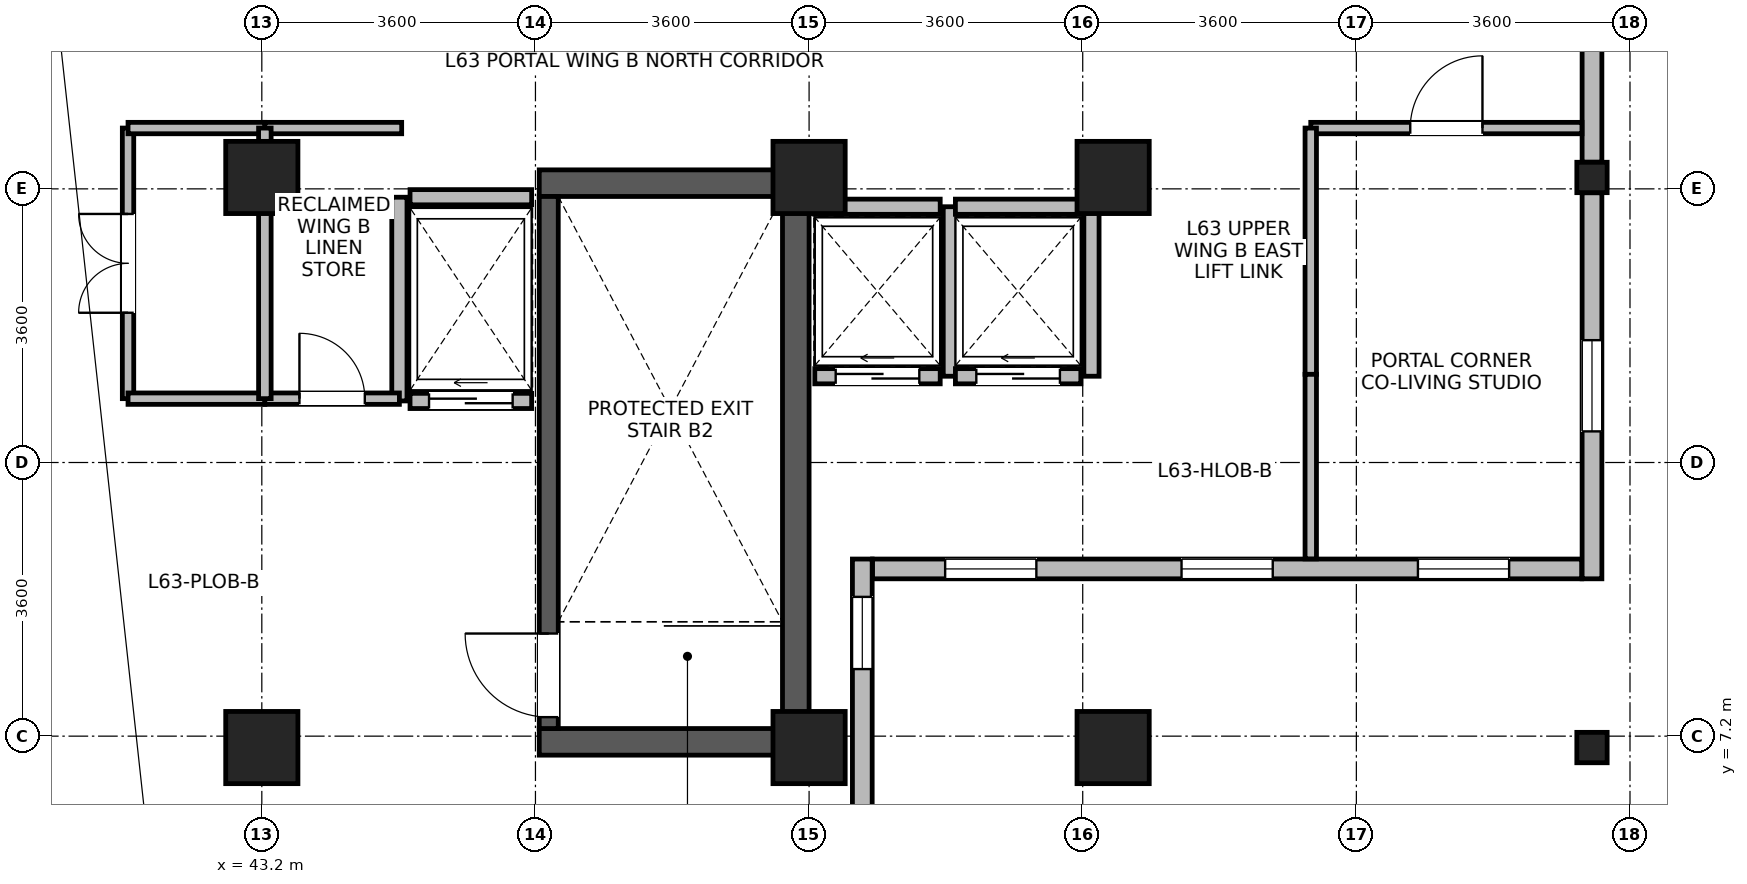
"""IFC4 building model, lengths in metres.
Left out: names, types, materials, properties, quantities, classifications, styles, units other than length and angle.
Written with IfcOpenShell. Run it as: python <this file> out.ifc"""

import sys

from ifc_helpers import new_model, si_unit, direction, frame, frame_2d, origin, origin_2d, place, context, subcontext, project, spatial, rectangle, i_section, extrude, source, transform, mapped, element, fill, save


model = new_model("IFC4")
c1 = context("Model", 3, precision=1e-05, world=origin(), true_north=direction((0.0, 1.0)))
c2 = subcontext(c1, "Body", "Model", "MODEL_VIEW")
j1 = project(units=[si_unit("LENGTHUNIT", "METRE"), si_unit("PLANEANGLEUNIT", "RADIAN")], contexts=[c1])
p1 = place(None, origin())
s1 = spatial("IfcSite", under=j1, at=p1, CompositionType="ELEMENT")
p2 = place(p1, origin())
s2 = spatial("IfcBuilding", under=s1, at=p2, CompositionType="ELEMENT")
p3 = place(p2, frame((0.0, 0.0, 246.2)))
s3 = spatial("IfcBuildingStorey", under=s2, at=p3, CompositionType="ELEMENT", Elevation=246.2)
p4 = place(p3, frame((50.225, 6.95, 0.0), z_axis=(0.0, 0.0, 1.0), x_axis=(0.0, 1.0, 0.0)))
e1 = element("IfcWall", 1, at=p4, inside=s3, PredefinedType="SHEAR", context=c2, shape_type="SweptSolid", body=[
    extrude(rectangle(XDim=7.7, YDim=0.35, at=frame_2d((3.85, 0.0))), origin(), (0.0, 0.0, 1.0), 3.28),
])
for number, where, z_axis, x_axis in (
    (2, (46.85, 7.125, 0.0), (0.0, 0.0, 1.0), (1.0, 0.0, 0.0)),
    (3, (46.85, 14.475, 0.0), (0.0, 0.0, 1.0), (1.0, 0.0, 0.0)),
):
    element("IfcWall", number, at=place(p3, frame(where, z_axis=z_axis, x_axis=x_axis)), inside=s3, PredefinedType="SHEAR", context=c2, shape_type="SweptSolid", body=[
        extrude(rectangle(XDim=3.2, YDim=0.35, at=frame_2d((1.6, 0.0))), origin(), (0.0, 0.0, 1.0), 3.28),
    ])
p5 = place(p3, frame((46.975, 7.3, 0.0), z_axis=(0.0, 0.0, 1.0), x_axis=(0.0, 1.0, 0.0)))
e4 = element("IfcWall", 4, at=p5, inside=s3, PredefinedType="SHEAR", context=c2, shape_type="SweptSolid", body=[
    extrude(rectangle(XDim=7.0, YDim=0.25, at=frame_2d((3.5, 0.0))), origin(), (0.0, 0.0, 1.0), 3.28),
])
p6 = place(p5, frame((0.15, 0.0, 0.0)))
e5 = element("IfcOpeningElement", 5, at=p6, cuts=e4, PredefinedType="OPENING", context=c2, shape_type="SweptSolid", body=[
    extrude(rectangle(XDim=1.1, YDim=2.08, at=frame_2d((0.55, 1.04))), frame((0.0, 0.135, 0.0), z_axis=(0.0, -1.0, 0.0), x_axis=(1.0, 0.0, 0.0)), (0.0, 0.0, 1.0), 0.27),
])
m1 = source(origin(), c2, "Body", "SweptSolid", [
    extrude(rectangle(XDim=0.95, YDim=0.95, at=origin_2d()), origin(), (0.0, 0.0, 1.0), 3.7),
])
for number, where, z_axis, x_axis in (
    (6, (43.2, 7.05, 0.0), (0.0, 0.0, 1.0), (1.0, 0.0, 0.0)),
    (7, (43.2, 14.55, 0.0), (0.0, 0.0, 1.0), (1.0, 0.0, 0.0)),
    (8, (50.4, 7.05, 0.0), (0.0, 0.0, 1.0), (1.0, 0.0, 0.0)),
    (9, (50.4, 14.55, 0.0), (0.0, 0.0, 1.0), (1.0, 0.0, 0.0)),
    (10, (54.4, 7.05, 0.0), (0.0, 0.0, 1.0), (1.0, 0.0, 0.0)),
    (11, (54.4, 14.55, 0.0), (0.0, 0.0, 1.0), (1.0, 0.0, 0.0)),
):
    element("IfcColumn", number, at=place(p3, frame(where, z_axis=z_axis, x_axis=x_axis)), inside=s3, PredefinedType="COLUMN", context=c2, shape_type="MappedRepresentation", body=[
        mapped(m1, transform((0.0, 0.0, 0.0), x_axis=(1.0, 0.0, 0.0), y_axis=(0.0, 1.0, 0.0), z_axis=(0.0, 0.0, 1.0), scale=1.0)),
    ])
m2 = source(origin(), c2, "Body", "SweptSolid", [
    extrude(i_section(OverallWidth=0.399, OverallDepth=0.4, WebThickness=0.017, FlangeThickness=0.023, FilletRadius=0.015, at=origin_2d()), origin(), (0.0, 0.0, 1.0), 3.7),
])
for number, where, z_axis, x_axis in (
    (12, (60.7, 7.05, 0.0), (0.0, 0.0, 1.0), (1.0, 0.0, 0.0)),
    (13, (60.7, 14.55, 0.0), (0.0, 0.0, 1.0), (1.0, 0.0, 0.0)),
):
    element("IfcColumn", number, at=place(p3, frame(where, z_axis=z_axis, x_axis=x_axis)), inside=s3, PredefinedType="COLUMN", context=c2, shape_type="MappedRepresentation", body=[
        mapped(m2, transform((0.0, 0.0, 0.0), x_axis=(1.0, 0.0, 0.0), y_axis=(0.0, 1.0, 0.0), z_axis=(0.0, 0.0, 1.0), scale=1.0)),
    ])
p7 = place(p3, frame((51.1, 9.53, 0.0), z_axis=(0.0, 0.0, 1.0), x_axis=(0.0, -1.0, 0.0)))
e14 = element("IfcWall", 14, at=p7, inside=s3, PredefinedType="STANDARD", context=c2, shape_type="SweptSolid", body=[
    extrude(rectangle(XDim=3.86, YDim=0.26, at=frame_2d((1.93, 0.0))), origin(), (0.0, 0.0, 1.0), 3.26),
])
p8 = place(p7, frame((0.498, 0.0, 0.85)))
e15 = element("IfcOpeningElement", 15, at=p8, cuts=e14, PredefinedType="OPENING", context=c2, shape_type="SweptSolid", body=[
    extrude(rectangle(XDim=0.95, YDim=1.75, at=frame_2d((0.475, 0.875))), frame((0.0, 0.14, 0.0), z_axis=(0.0, -1.0, 0.0), x_axis=(1.0, 0.0, 0.0)), (0.0, 0.0, 1.0), 0.28),
])
p9 = place(p3, frame((60.565, 9.4, 0.0), z_axis=(0.0, 0.0, 1.0), x_axis=(-1.0, 0.0, 0.0)))
e16 = element("IfcWall", 16, at=p9, inside=s3, PredefinedType="STANDARD", context=c2, shape_type="SweptSolid", body=[
    extrude(rectangle(XDim=9.33, YDim=0.26, at=frame_2d((4.665, 0.0))), origin(), (0.0, 0.0, 1.0), 3.26),
])
p10 = place(p9, frame((0.955, 0.0, 0.85)))
e17 = element("IfcOpeningElement", 17, at=p10, cuts=e16, PredefinedType="OPENING", context=c2, shape_type="SweptSolid", body=[
    extrude(rectangle(XDim=1.2, YDim=1.75, at=frame_2d((0.6, 0.875))), frame((0.0, 0.14, 0.0), z_axis=(0.0, -1.0, 0.0), x_axis=(1.0, 0.0, 0.0)), (0.0, 0.0, 1.0), 0.28),
])
p11 = place(p9, frame((4.065, 0.0, 0.85)))
e18 = element("IfcOpeningElement", 18, at=p11, cuts=e16, PredefinedType="OPENING", context=c2, shape_type="SweptSolid", body=[
    extrude(rectangle(XDim=1.2, YDim=1.75, at=frame_2d((0.6, 0.875))), frame((0.0, 0.14, 0.0), z_axis=(0.0, -1.0, 0.0), x_axis=(1.0, 0.0, 0.0)), (0.0, 0.0, 1.0), 0.28),
])
p12 = place(p9, frame((7.175, 0.0, 0.85)))
e19 = element("IfcOpeningElement", 19, at=p12, cuts=e16, PredefinedType="OPENING", context=c2, shape_type="SweptSolid", body=[
    extrude(rectangle(XDim=1.2, YDim=1.75, at=frame_2d((0.6, 0.875))), frame((0.0, 0.14, 0.0), z_axis=(0.0, -1.0, 0.0), x_axis=(1.0, 0.0, 0.0)), (0.0, 0.0, 1.0), 0.28),
])
p13 = place(p3, frame((60.7, 14.349, 0.0), z_axis=(0.0, 0.0, 1.0), x_axis=(0.0, -1.0, 0.0)))
e20 = element("IfcWall", 20, at=p13, inside=s3, PredefinedType="STANDARD", context=c2, shape_type="SweptSolid", body=[
    extrude(rectangle(XDim=5.079, YDim=0.26, at=frame_2d((2.54, 0.0))), origin(), (0.0, 0.0, 1.0), 2.86),
])
p14 = place(p13, frame((1.939, 0.0, 0.85)))
e21 = element("IfcOpeningElement", 21, at=p14, cuts=e20, PredefinedType="OPENING", context=c2, shape_type="SweptSolid", body=[
    extrude(rectangle(XDim=1.2, YDim=1.75, at=frame_2d((0.6, 0.875))), frame((0.0, 0.14, 0.0), z_axis=(0.0, -1.0, 0.0), x_axis=(1.0, 0.0, 0.0)), (0.0, 0.0, 1.0), 0.28),
])
p15 = place(p3, frame((60.7, 21.399, 0.0), z_axis=(0.0, 0.0, 1.0), x_axis=(0.0, -1.0, 0.0)))
e22 = element("IfcWall", 22, at=p15, inside=s3, PredefinedType="STANDARD", context=c2, shape_type="SweptSolid", body=[
    extrude(rectangle(XDim=6.648, YDim=0.26, at=frame_2d((3.324, 0.0))), origin(), (0.0, 0.0, 1.0), 2.86),
])
p16 = place(p15, frame((1.062, 0.0, 0.85)))
e23 = element("IfcOpeningElement", 23, at=p16, cuts=e22, PredefinedType="OPENING", context=c2, shape_type="SweptSolid", body=[
    extrude(rectangle(XDim=1.2, YDim=1.75, at=frame_2d((0.6, 0.875))), frame((0.0, 0.14, 0.0), z_axis=(0.0, -1.0, 0.0), x_axis=(1.0, 0.0, 0.0)), (0.0, 0.0, 1.0), 0.28),
])
p17 = place(p15, frame((2.849, 0.0, 0.85)))
e24 = element("IfcOpeningElement", 24, at=p17, cuts=e22, PredefinedType="OPENING", context=c2, shape_type="SweptSolid", body=[
    extrude(rectangle(XDim=0.95, YDim=1.75, at=frame_2d((0.475, 0.875))), frame((0.0, 0.14, 0.0), z_axis=(0.0, -1.0, 0.0), x_axis=(1.0, 0.0, 0.0)), (0.0, 0.0, 1.0), 0.28),
])
p18 = place(p3, frame((50.475, 11.935, 0.0), z_axis=(0.0, 0.0, 1.0), x_axis=(1.0, 0.0, 0.0)))
e25 = element("IfcWall", 25, at=p18, inside=s3, PredefinedType="PARTITIONING", context=c2, shape_type="SweptSolid", body=[
    extrude(rectangle(XDim=1.65, YDim=0.2, at=frame_2d((0.825, 0.0))), origin(), (0.0, 0.0, 1.0), 3.26),
])
p19 = place(p18, frame((0.275, 0.0, 0.0)))
e26 = element("IfcOpeningElement", 26, at=p19, cuts=e25, PredefinedType="OPENING", context=c2, shape_type="SweptSolid", body=[
    extrude(rectangle(XDim=1.1, YDim=2.12, at=frame_2d((0.55, 1.06))), frame((0.0, 0.11, 0.0), z_axis=(0.0, -1.0, 0.0), x_axis=(1.0, 0.0, 0.0)), (0.0, 0.0, 1.0), 0.22),
])
p20 = place(p3, frame((50.475, 14.165, 0.0), z_axis=(0.0, 0.0, 1.0), x_axis=(1.0, 0.0, 0.0)))
e27 = element("IfcWall", 27, at=p20, inside=s3, PredefinedType="PARTITIONING", context=c2, shape_type="SweptSolid", body=[
    extrude(rectangle(XDim=1.65, YDim=0.2, at=frame_2d((0.825, 0.0))), origin(), (0.0, 0.0, 1.0), 3.26),
])
p21 = place(p3, frame((52.265, 11.935, 0.0), z_axis=(0.0, 0.0, 1.0), x_axis=(0.0, 1.0, 0.0)))
e28 = element("IfcWall", 28, at=p21, inside=s3, PredefinedType="PARTITIONING", context=c2, shape_type="SweptSolid", body=[
    extrude(rectangle(XDim=2.23, YDim=0.2, at=frame_2d((1.115, 0.0))), origin(), (0.0, 0.0, 1.0), 3.26),
])
p22 = place(p3, frame((52.325, 11.935, 0.0), z_axis=(0.0, 0.0, 1.0), x_axis=(1.0, 0.0, 0.0)))
e29 = element("IfcWall", 29, at=p22, inside=s3, PredefinedType="PARTITIONING", context=c2, shape_type="SweptSolid", body=[
    extrude(rectangle(XDim=1.65, YDim=0.2, at=frame_2d((0.825, 0.0))), origin(), (0.0, 0.0, 1.0), 3.26),
])
p23 = place(p22, frame((0.275, 0.0, 0.0)))
e30 = element("IfcOpeningElement", 30, at=p23, cuts=e29, PredefinedType="OPENING", context=c2, shape_type="SweptSolid", body=[
    extrude(rectangle(XDim=1.1, YDim=2.12, at=frame_2d((0.55, 1.06))), frame((0.0, 0.11, 0.0), z_axis=(0.0, -1.0, 0.0), x_axis=(1.0, 0.0, 0.0)), (0.0, 0.0, 1.0), 0.22),
])
p24 = place(p3, frame((52.325, 14.165, 0.0), z_axis=(0.0, 0.0, 1.0), x_axis=(1.0, 0.0, 0.0)))
e31 = element("IfcWall", 31, at=p24, inside=s3, PredefinedType="PARTITIONING", context=c2, shape_type="SweptSolid", body=[
    extrude(rectangle(XDim=1.65, YDim=0.2, at=frame_2d((0.825, 0.0))), origin(), (0.0, 0.0, 1.0), 3.26),
])
p25 = place(p3, frame((54.115, 11.935, 0.0), z_axis=(0.0, 0.0, 1.0), x_axis=(0.0, 1.0, 0.0)))
e32 = element("IfcWall", 32, at=p25, inside=s3, PredefinedType="PARTITIONING", context=c2, shape_type="SweptSolid", body=[
    extrude(rectangle(XDim=2.23, YDim=0.2, at=frame_2d((1.115, 0.0))), origin(), (0.0, 0.0, 1.0), 3.26),
])
p26 = place(p3, frame((45.15, 11.61, 0.0), z_axis=(0.0, 0.0, 1.0), x_axis=(1.0, 0.0, 0.0)))
e33 = element("IfcWall", 33, at=p26, inside=s3, PredefinedType="PARTITIONING", context=c2, shape_type="SweptSolid", body=[
    extrude(rectangle(XDim=1.6, YDim=0.2, at=frame_2d((0.8, 0.0))), origin(), (0.0, 0.0, 1.0), 3.26),
])
p27 = place(p26, frame((0.25, 0.0, 0.0)))
e34 = element("IfcOpeningElement", 34, at=p27, cuts=e33, PredefinedType="OPENING", context=c2, shape_type="SweptSolid", body=[
    extrude(rectangle(XDim=1.1, YDim=2.12, at=frame_2d((0.55, 1.06))), frame((0.0, 0.11, 0.0), z_axis=(0.0, -1.0, 0.0), x_axis=(1.0, 0.0, 0.0)), (0.0, 0.0, 1.0), 0.22),
])
p28 = place(p3, frame((45.15, 14.29, 0.0), z_axis=(0.0, 0.0, 1.0), x_axis=(1.0, 0.0, 0.0)))
e35 = element("IfcWall", 35, at=p28, inside=s3, PredefinedType="PARTITIONING", context=c2, shape_type="SweptSolid", body=[
    extrude(rectangle(XDim=1.6, YDim=0.2, at=frame_2d((0.8, 0.0))), origin(), (0.0, 0.0, 1.0), 2.36),
])
p29 = place(p3, frame((45.01, 11.61, 0.0), z_axis=(0.0, 0.0, 1.0), x_axis=(0.0, 1.0, 0.0)))
e36 = element("IfcWall", 36, at=p29, inside=s3, PredefinedType="PARTITIONING", context=c2, shape_type="SweptSolid", body=[
    extrude(rectangle(XDim=2.68, YDim=0.2, at=frame_2d((1.34, 0.0))), origin(), (0.0, 0.0, 1.0), 3.26),
])
p30 = place(p3, frame((57.0, 15.2, 0.0), z_axis=(0.0, 0.0, 1.0), x_axis=(1.0, 0.0, 0.0)))
e37 = element("IfcWall", 37, at=p30, inside=s3, PredefinedType="PARTITIONING", context=c2, shape_type="SweptSolid", body=[
    extrude(rectangle(XDim=3.568, YDim=0.15, at=frame_2d((1.784, 0.0))), origin(), (0.0, 0.0, 1.0), 3.26),
])
p31 = place(p30, frame((1.309, 0.0, 0.0)))
e38 = element("IfcOpeningElement", 38, at=p31, cuts=e37, PredefinedType="OPENING", context=c2, shape_type="SweptSolid", body=[
    extrude(rectangle(XDim=0.95, YDim=2.1, at=frame_2d((0.475, 1.05))), frame((0.0, 0.085, 0.0), z_axis=(0.0, -1.0, 0.0), x_axis=(1.0, 0.0, 0.0)), (0.0, 0.0, 1.0), 0.17),
])
p32 = place(p3, frame((41.44, 11.64, 0.0), z_axis=(0.0, 0.0, 1.0), x_axis=(0.0, 1.0, 0.0)))
e39 = element("IfcWall", 39, at=p32, inside=s3, PredefinedType="PARTITIONING", context=c2, shape_type="SweptSolid", body=[
    extrude(rectangle(XDim=3.56, YDim=0.15, at=frame_2d((1.78, 0.0))), origin(), (0.0, 0.0, 1.0), 3.26),
])
p33 = place(p32, frame((1.13, 0.0, 0.0)))
e40 = element("IfcOpeningElement", 40, at=p33, cuts=e39, PredefinedType="OPENING", context=c2, shape_type="SweptSolid", body=[
    extrude(rectangle(XDim=1.3, YDim=2.12, at=frame_2d((0.65, 1.06))), frame((0.0, 0.085, 0.0), z_axis=(0.0, -1.0, 0.0), x_axis=(1.0, 0.0, 0.0)), (0.0, 0.0, 1.0), 0.17),
])
p34 = place(p3, frame((57.0, 11.96, 0.0), z_axis=(0.0, 0.0, 1.0), x_axis=(0.0, 1.0, 0.0)))
e41 = element("IfcWall", 41, at=p34, inside=s3, PredefinedType="PARTITIONING", context=c2, shape_type="SweptSolid", body=[
    extrude(rectangle(XDim=3.24, YDim=0.15, at=frame_2d((1.62, 0.0))), origin(), (0.0, 0.0, 1.0), 3.26),
])
p35 = place(p3, frame((57.0, 9.532, 0.0), z_axis=(0.0, 0.0, 1.0), x_axis=(0.0, 1.0, 0.0)))
e42 = element("IfcWall", 42, at=p35, inside=s3, PredefinedType="PARTITIONING", context=c2, shape_type="SweptSolid", body=[
    extrude(rectangle(XDim=2.428, YDim=0.15, at=frame_2d((1.214, 0.0))), origin(), (0.0, 0.0, 1.0), 3.26),
])
for number, where, z_axis, x_axis in (
    (43, (41.44, 11.64, 0.0), (0.0, 0.0, 1.0), (1.0, 0.0, 0.0)),
    (44, (41.44, 15.2, 0.0), (0.0, 0.0, 1.0), (1.0, 0.0, 0.0)),
):
    element("IfcWall", number, at=place(p3, frame(where, z_axis=z_axis, x_axis=x_axis)), inside=s3, PredefinedType="PARTITIONING", context=c2, shape_type="SweptSolid", body=[
        extrude(rectangle(XDim=1.8, YDim=0.15, at=frame_2d((0.9, 0.0))), origin(), (0.0, 0.0, 1.0), 3.26),
    ])
p36 = place(p3, frame((43.24, 11.64, 0.0), z_axis=(0.0, 0.0, 1.0), x_axis=(1.0, 0.0, 0.0)))
e45 = element("IfcWall", 45, at=p36, inside=s3, PredefinedType="PARTITIONING", context=c2, shape_type="SweptSolid", body=[
    extrude(rectangle(XDim=1.77, YDim=0.15, at=frame_2d((0.885, 0.0))), origin(), (0.0, 0.0, 1.0), 3.26),
])
p37 = place(p36, frame((0.455, 0.0, 0.0)))
e46 = element("IfcOpeningElement", 46, at=p37, cuts=e45, PredefinedType="OPENING", context=c2, shape_type="SweptSolid", body=[
    extrude(rectangle(XDim=0.86, YDim=2.02, at=frame_2d((0.43, 1.01))), frame((0.0, 0.085, 0.0), z_axis=(0.0, -1.0, 0.0), x_axis=(1.0, 0.0, 0.0)), (0.0, 0.0, 1.0), 0.17),
])
p38 = place(p3, frame((43.24, 15.2, 0.0), z_axis=(0.0, 0.0, 1.0), x_axis=(1.0, 0.0, 0.0)))
e47 = element("IfcWall", 47, at=p38, inside=s3, PredefinedType="PARTITIONING", context=c2, shape_type="SweptSolid", body=[
    extrude(rectangle(XDim=1.8, YDim=0.15, at=frame_2d((0.9, 0.0))), origin(), (0.0, 0.0, 1.0), 3.26),
])
p39 = place(p3, frame((43.24, 11.64, 0.0), z_axis=(0.0, 0.0, 1.0), x_axis=(0.0, 1.0, 0.0)))
e48 = element("IfcWall", 48, at=p39, inside=s3, PredefinedType="PARTITIONING", context=c2, shape_type="SweptSolid", body=[
    extrude(rectangle(XDim=3.56, YDim=0.165, at=frame_2d((1.78, 0.0))), origin(), (0.0, 0.0, 1.0), 3.26),
])
p40 = place(p8, origin())
e49 = element("IfcWindow", 49, at=p40, inside=s3, PartitioningType="SINGLE_PANEL", PredefinedType="WINDOW", context=c2, shape_type="SweptSolid", body=[
    extrude(rectangle(XDim=0.95, YDim=1.75, at=frame_2d((0.475, 0.875))), frame((0.0, 0.03, 0.0), z_axis=(0.0, -1.0, 0.0), x_axis=(1.0, 0.0, 0.0)), (0.0, 0.0, 1.0), 0.06),
])
fill(e15, e49)
p41 = place(p10, origin())
e50 = element("IfcWindow", 50, at=p41, inside=s3, PartitioningType="SINGLE_PANEL", PredefinedType="WINDOW", context=c2, shape_type="SweptSolid", body=[
    extrude(rectangle(XDim=1.2, YDim=1.75, at=frame_2d((0.6, 0.875))), frame((0.0, 0.03, 0.0), z_axis=(0.0, -1.0, 0.0), x_axis=(1.0, 0.0, 0.0)), (0.0, 0.0, 1.0), 0.06),
])
fill(e17, e50)
p42 = place(p11, origin())
e51 = element("IfcWindow", 51, at=p42, inside=s3, PartitioningType="SINGLE_PANEL", PredefinedType="WINDOW", context=c2, shape_type="SweptSolid", body=[
    extrude(rectangle(XDim=1.2, YDim=1.75, at=frame_2d((0.6, 0.875))), frame((0.0, 0.03, 0.0), z_axis=(0.0, -1.0, 0.0), x_axis=(1.0, 0.0, 0.0)), (0.0, 0.0, 1.0), 0.06),
])
fill(e18, e51)
p43 = place(p12, origin())
e52 = element("IfcWindow", 52, at=p43, inside=s3, PartitioningType="SINGLE_PANEL", PredefinedType="WINDOW", context=c2, shape_type="SweptSolid", body=[
    extrude(rectangle(XDim=1.2, YDim=1.75, at=frame_2d((0.6, 0.875))), frame((0.0, 0.03, 0.0), z_axis=(0.0, -1.0, 0.0), x_axis=(1.0, 0.0, 0.0)), (0.0, 0.0, 1.0), 0.06),
])
fill(e19, e52)
p44 = place(p14, origin())
e53 = element("IfcWindow", 53, at=p44, inside=s3, PartitioningType="SINGLE_PANEL", PredefinedType="WINDOW", context=c2, shape_type="SweptSolid", body=[
    extrude(rectangle(XDim=1.2, YDim=1.75, at=frame_2d((0.6, 0.875))), frame((0.0, 0.03, 0.0), z_axis=(0.0, -1.0, 0.0), x_axis=(1.0, 0.0, 0.0)), (0.0, 0.0, 1.0), 0.06),
])
fill(e21, e53)
p45 = place(p6, origin())
e54 = element("IfcDoor", 54, at=p45, inside=s3, OperationType="SINGLE_SWING_RIGHT", PredefinedType="DOOR", context=c2, shape_type="SweptSolid", body=[
    extrude(rectangle(XDim=1.1, YDim=2.08, at=frame_2d((0.55, 1.04))), frame((0.0, 0.025, 0.0), z_axis=(0.0, -1.0, 0.0), x_axis=(1.0, 0.0, 0.0)), (0.0, 0.0, 1.0), 0.05),
])
fill(e5, e54)
p46 = place(p19, origin())
e55 = element("IfcDoor", 55, at=p46, inside=s3, OperationType="SLIDING_TO_LEFT", PredefinedType="DOOR", context=c2, shape_type="SweptSolid", body=[
    extrude(rectangle(XDim=1.1, YDim=2.12, at=frame_2d((0.55, 1.06))), frame((0.0, 0.025, 0.0), z_axis=(0.0, -1.0, 0.0), x_axis=(1.0, 0.0, 0.0)), (0.0, 0.0, 1.0), 0.05),
])
fill(e26, e55)
p47 = place(p23, origin())
e56 = element("IfcDoor", 56, at=p47, inside=s3, OperationType="SLIDING_TO_LEFT", PredefinedType="DOOR", context=c2, shape_type="SweptSolid", body=[
    extrude(rectangle(XDim=1.1, YDim=2.12, at=frame_2d((0.55, 1.06))), frame((0.0, 0.025, 0.0), z_axis=(0.0, -1.0, 0.0), x_axis=(1.0, 0.0, 0.0)), (0.0, 0.0, 1.0), 0.05),
])
fill(e30, e56)
p48 = place(p27, origin())
e57 = element("IfcDoor", 57, at=p48, inside=s3, OperationType="SLIDING_TO_LEFT", PredefinedType="DOOR", context=c2, shape_type="SweptSolid", body=[
    extrude(rectangle(XDim=1.1, YDim=2.12, at=frame_2d((0.55, 1.06))), frame((0.0, 0.025, 0.0), z_axis=(0.0, -1.0, 0.0), x_axis=(1.0, 0.0, 0.0)), (0.0, 0.0, 1.0), 0.05),
])
fill(e34, e57)
p49 = place(p31, origin())
e58 = element("IfcDoor", 58, at=p49, inside=s3, OperationType="SINGLE_SWING_RIGHT", PredefinedType="DOOR", context=c2, shape_type="SweptSolid", body=[
    extrude(rectangle(XDim=0.95, YDim=2.1, at=frame_2d((0.475, 1.05))), frame((0.0, 0.025, 0.0), z_axis=(0.0, -1.0, 0.0), x_axis=(1.0, 0.0, 0.0)), (0.0, 0.0, 1.0), 0.05),
])
fill(e38, e58)
p50 = place(p33, origin())
e59 = element("IfcDoor", 59, at=p50, inside=s3, OperationType="DOUBLE_DOOR_SINGLE_SWING", PredefinedType="DOOR", context=c2, shape_type="SweptSolid", body=[
    extrude(rectangle(XDim=1.3, YDim=2.12, at=frame_2d((0.65, 1.06))), frame((0.0, 0.025, 0.0), z_axis=(0.0, -1.0, 0.0), x_axis=(1.0, 0.0, 0.0)), (0.0, 0.0, 1.0), 0.05),
])
fill(e40, e59)
p51 = place(p37, origin())
e60 = element("IfcDoor", 60, at=p51, inside=s3, OperationType="SINGLE_SWING_LEFT", PredefinedType="DOOR", context=c2, shape_type="SweptSolid", body=[
    extrude(rectangle(XDim=0.86, YDim=2.02, at=frame_2d((0.43, 1.01))), frame((0.0, 0.025, 0.0), z_axis=(0.0, -1.0, 0.0), x_axis=(1.0, 0.0, 0.0)), (0.0, 0.0, 1.0), 0.05),
])
fill(e46, e60)
save(model, sys.argv[1])
